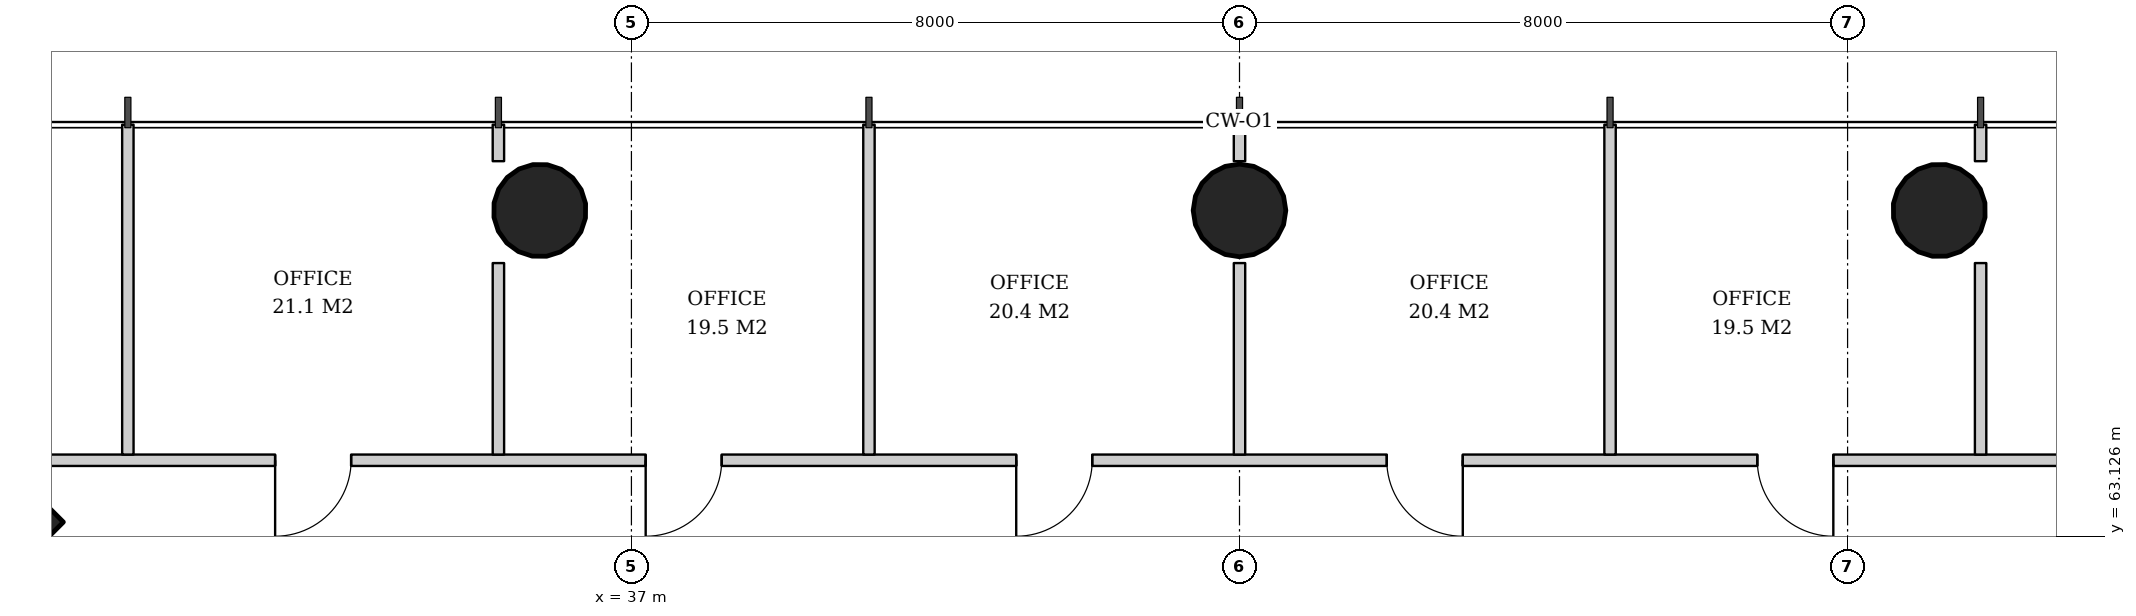
"""IFC4 building model, lengths in metres.
Left out: names, types, materials, properties, quantities, classifications, styles, units other than length and angle.
Written with IfcOpenShell. Run it as: python <this file> out.ifc"""

import sys

from ifc_helpers import new_model, si_unit, direction, frame, frame_2d, origin, origin_2d, place, context, subcontext, project, spatial, rectangle, hollow_circle, extrude, element, fill, save


model = new_model("IFC4")
c1 = context("Model", 3, precision=1e-05, world=origin(), true_north=direction((0.0, 1.0)))
c2 = subcontext(c1, "Body", "Model", "MODEL_VIEW")
j1 = project(units=[si_unit("LENGTHUNIT", "METRE"), si_unit("PLANEANGLEUNIT", "RADIAN")], contexts=[c1])
p1 = place(None, origin())
s1 = spatial("IfcSite", under=j1, at=p1, CompositionType="ELEMENT")
p2 = place(p1, origin())
s2 = spatial("IfcBuilding", under=s1, at=p2, CompositionType="ELEMENT")
p3 = place(p2, frame((0.0, 0.0, 100.8)))
s3 = spatial("IfcBuildingStorey", under=s2, at=p3, CompositionType="ELEMENT", Elevation=100.8)
p4 = place(p3, frame((27.65, 63.35, 0.0), z_axis=(0.031962158256, -0.031962158256, 0.998977898093), x_axis=(0.707106781187, 0.707106781187, 0.0)))
e1 = element("IfcColumn", 1, at=p4, inside=s3, PredefinedType="COLUMN", context=c2, shape_type="SweptSolid", body=[
    extrude(rectangle(XDim=2.6, YDim=2.6, at=origin_2d()), origin(), (0.0, 0.0, 1.0), 3.804),
])
p5 = place(p3, frame((54.225, 67.45, 0.0), z_axis=(-0.015987237665, -0.031910269556, 0.999362868496), x_axis=(0.894067115991, -0.447933021895, 0.0)))
e2 = element("IfcColumn", 2, at=p5, inside=s3, PredefinedType="COLUMN", context=c2, shape_type="SweptSolid", body=[
    extrude(hollow_circle(Radius=0.61, WallThickness=0.04, at=origin_2d()), origin(), (0.0, 0.0, 1.0), 3.802),
])
p6 = place(p3, frame((45.0, 67.45, 0.0), z_axis=(0.0, -0.031914348339, 0.999490607445), x_axis=(1.0, 0.0, 0.0)))
e3 = element("IfcColumn", 3, at=p6, inside=s3, PredefinedType="COLUMN", context=c2, shape_type="SweptSolid", body=[
    extrude(hollow_circle(Radius=0.61, WallThickness=0.04, at=origin_2d()), origin(), (0.0, 0.0, 1.0), 3.802),
])
p7 = place(p3, frame((35.775, 67.45, 0.0), z_axis=(0.015987237665, -0.031910269556, 0.999362868496), x_axis=(0.894067115991, 0.447933021895, 0.0)))
e4 = element("IfcColumn", 4, at=p7, inside=s3, PredefinedType="COLUMN", context=c2, shape_type="SweptSolid", body=[
    extrude(hollow_circle(Radius=0.61, WallThickness=0.04, at=origin_2d()), origin(), (0.0, 0.0, 1.0), 3.802),
])
p8 = place(p3, frame((61.211, 64.125, 0.0), z_axis=(0.0, 0.0, 1.0), x_axis=(-1.0, 0.0, 0.0)))
e5 = element("IfcWall", 5, at=p8, inside=s3, PredefinedType="PARTITIONING", context=c2, shape_type="SweptSolid", body=[
    extrude(rectangle(XDim=32.423, YDim=0.15, at=frame_2d((16.211, 0.0))), origin(), (0.0, 0.0, 1.0), 2.72),
])
p9 = place(p8, frame((3.524, 0.0, 0.0)))
e6 = element("IfcOpeningElement", 6, at=p9, cuts=e5, PredefinedType="OPENING", context=c2, shape_type="SweptSolid", body=[
    extrude(rectangle(XDim=1.0, YDim=2.1, at=frame_2d((0.5, 1.05))), frame((0.0, 0.085, 0.0), z_axis=(0.0, -1.0, 0.0), x_axis=(1.0, 0.0, 0.0)), (0.0, 0.0, 1.0), 0.17),
])
p10 = place(p8, frame((8.399, 0.0, 0.0)))
e7 = element("IfcOpeningElement", 7, at=p10, cuts=e5, PredefinedType="OPENING", context=c2, shape_type="SweptSolid", body=[
    extrude(rectangle(XDim=1.0, YDim=2.1, at=frame_2d((0.5, 1.05))), frame((0.0, 0.085, 0.0), z_axis=(0.0, -1.0, 0.0), x_axis=(1.0, 0.0, 0.0)), (0.0, 0.0, 1.0), 0.17),
])
p11 = place(p8, frame((13.274, 0.0, 0.0)))
e8 = element("IfcOpeningElement", 8, at=p11, cuts=e5, PredefinedType="OPENING", context=c2, shape_type="SweptSolid", body=[
    extrude(rectangle(XDim=1.0, YDim=2.1, at=frame_2d((0.5, 1.05))), frame((0.0, 0.085, 0.0), z_axis=(0.0, -1.0, 0.0), x_axis=(1.0, 0.0, 0.0)), (0.0, 0.0, 1.0), 0.17),
])
p12 = place(p8, frame((18.149, 0.0, 0.0)))
e9 = element("IfcOpeningElement", 9, at=p12, cuts=e5, PredefinedType="OPENING", context=c2, shape_type="SweptSolid", body=[
    extrude(rectangle(XDim=1.0, YDim=2.1, at=frame_2d((0.5, 1.05))), frame((0.0, 0.085, 0.0), z_axis=(0.0, -1.0, 0.0), x_axis=(1.0, 0.0, 0.0)), (0.0, 0.0, 1.0), 0.17),
])
p13 = place(p8, frame((23.024, 0.0, 0.0)))
e10 = element("IfcOpeningElement", 10, at=p13, cuts=e5, PredefinedType="OPENING", context=c2, shape_type="SweptSolid", body=[
    extrude(rectangle(XDim=1.0, YDim=2.1, at=frame_2d((0.5, 1.05))), frame((0.0, 0.085, 0.0), z_axis=(0.0, -1.0, 0.0), x_axis=(1.0, 0.0, 0.0)), (0.0, 0.0, 1.0), 0.17),
])
p14 = place(p8, frame((27.899, 0.0, 0.0)))
e11 = element("IfcOpeningElement", 11, at=p14, cuts=e5, PredefinedType="OPENING", context=c2, shape_type="SweptSolid", body=[
    extrude(rectangle(XDim=1.0, YDim=2.1, at=frame_2d((0.5, 1.05))), frame((0.0, 0.085, 0.0), z_axis=(0.0, -1.0, 0.0), x_axis=(1.0, 0.0, 0.0)), (0.0, 0.0, 1.0), 0.17),
])
p15 = place(p3, frame((54.75, 64.2, 0.0), z_axis=(0.0, 0.0, 1.0), x_axis=(0.0, 1.0, 0.0)))
e12 = element("IfcWall", 12, at=p15, inside=s3, PredefinedType="PARTITIONING", context=c2, shape_type="SweptSolid", body=[
    extrude(rectangle(XDim=2.519, YDim=0.15, at=frame_2d((1.26, 0.0))), origin(), (0.0, 0.0, 1.0), 3.62),
])
p16 = place(p3, frame((54.75, 68.06, 0.0), z_axis=(0.0, 0.0, 1.0), x_axis=(0.0, 1.0, 0.0)))
e13 = element("IfcWall", 13, at=p16, inside=s3, PredefinedType="PARTITIONING", context=c2, shape_type="SweptSolid", body=[
    extrude(rectangle(XDim=0.48, YDim=0.15, at=frame_2d((0.24, 0.0))), origin(), (0.0, 0.0, 1.0), 3.62),
])
p17 = place(p3, frame((49.875, 64.2, 0.0), z_axis=(0.0, 0.0, 1.0), x_axis=(0.0, 1.0, 0.0)))
e14 = element("IfcWall", 14, at=p17, inside=s3, PredefinedType="PARTITIONING", context=c2, shape_type="SweptSolid", body=[
    extrude(rectangle(XDim=4.34, YDim=0.15, at=frame_2d((2.17, 0.0))), origin(), (0.0, 0.0, 1.0), 2.82),
])
p18 = place(p3, frame((45.0, 64.2, 0.0), z_axis=(0.0, 0.0, 1.0), x_axis=(0.0, 1.0, 0.0)))
e15 = element("IfcWall", 15, at=p18, inside=s3, PredefinedType="PARTITIONING", context=c2, shape_type="SweptSolid", body=[
    extrude(rectangle(XDim=2.519, YDim=0.15, at=frame_2d((1.26, 0.0))), origin(), (0.0, 0.0, 1.0), 2.858),
])
p19 = place(p3, frame((45.0, 68.06, 0.0), z_axis=(0.0, 0.0, 1.0), x_axis=(0.0, 1.0, 0.0)))
e16 = element("IfcWall", 16, at=p19, inside=s3, PredefinedType="PARTITIONING", context=c2, shape_type="SweptSolid", body=[
    extrude(rectangle(XDim=0.48, YDim=0.15, at=frame_2d((0.24, 0.0))), origin(), (0.0, 0.0, 1.0), 3.62),
])
p20 = place(p3, frame((40.125, 64.2, 0.0), z_axis=(0.0, 0.0, 1.0), x_axis=(0.0, 1.0, 0.0)))
e17 = element("IfcWall", 17, at=p20, inside=s3, PredefinedType="PARTITIONING", context=c2, shape_type="SweptSolid", body=[
    extrude(rectangle(XDim=4.34, YDim=0.15, at=frame_2d((2.17, 0.0))), origin(), (0.0, 0.0, 1.0), 2.82),
])
p21 = place(p3, frame((35.25, 64.2, 0.0), z_axis=(0.0, 0.0, 1.0), x_axis=(0.0, 1.0, 0.0)))
e18 = element("IfcWall", 18, at=p21, inside=s3, PredefinedType="PARTITIONING", context=c2, shape_type="SweptSolid", body=[
    extrude(rectangle(XDim=2.519, YDim=0.15, at=frame_2d((1.26, 0.0))), origin(), (0.0, 0.0, 1.0), 3.62),
])
p22 = place(p3, frame((35.25, 68.06, 0.0), z_axis=(0.0, 0.0, 1.0), x_axis=(0.0, 1.0, 0.0)))
e19 = element("IfcWall", 19, at=p22, inside=s3, PredefinedType="PARTITIONING", context=c2, shape_type="SweptSolid", body=[
    extrude(rectangle(XDim=0.48, YDim=0.15, at=frame_2d((0.24, 0.0))), origin(), (0.0, 0.0, 1.0), 3.62),
])
p23 = place(p3, frame((30.375, 64.2, 0.0), z_axis=(0.0, 0.0, 1.0), x_axis=(0.0, 1.0, 0.0)))
e20 = element("IfcWall", 20, at=p23, inside=s3, PredefinedType="PARTITIONING", context=c2, shape_type="SweptSolid", body=[
    extrude(rectangle(XDim=4.34, YDim=0.15, at=frame_2d((2.17, 0.0))), origin(), (0.0, 0.0, 1.0), 2.82),
])
p24 = place(p10, origin())
e21 = element("IfcDoor", 21, at=p24, inside=s3, OperationType="SINGLE_SWING_LEFT", PredefinedType="DOOR", context=c2, shape_type="SweptSolid", body=[
    extrude(rectangle(XDim=1.0, YDim=2.1, at=frame_2d((0.5, 1.05))), frame((0.0, 0.025, 0.0), z_axis=(0.0, -1.0, 0.0), x_axis=(1.0, 0.0, 0.0)), (0.0, 0.0, 1.0), 0.05),
])
fill(e7, e21)
p25 = place(p11, origin())
e22 = element("IfcDoor", 22, at=p25, inside=s3, OperationType="SINGLE_SWING_LEFT", PredefinedType="DOOR", context=c2, shape_type="SweptSolid", body=[
    extrude(rectangle(XDim=1.0, YDim=2.1, at=frame_2d((0.5, 1.05))), frame((0.0, 0.025, 0.0), z_axis=(0.0, -1.0, 0.0), x_axis=(1.0, 0.0, 0.0)), (0.0, 0.0, 1.0), 0.05),
])
fill(e8, e22)
p26 = place(p12, origin())
e23 = element("IfcDoor", 23, at=p26, inside=s3, OperationType="SINGLE_SWING_RIGHT", PredefinedType="DOOR", context=c2, shape_type="SweptSolid", body=[
    extrude(rectangle(XDim=1.0, YDim=2.1, at=frame_2d((0.5, 1.05))), frame((0.0, 0.025, 0.0), z_axis=(0.0, -1.0, 0.0), x_axis=(1.0, 0.0, 0.0)), (0.0, 0.0, 1.0), 0.05),
])
fill(e9, e23)
p27 = place(p13, origin())
e24 = element("IfcDoor", 24, at=p27, inside=s3, OperationType="SINGLE_SWING_RIGHT", PredefinedType="DOOR", context=c2, shape_type="SweptSolid", body=[
    extrude(rectangle(XDim=1.0, YDim=2.1, at=frame_2d((0.5, 1.05))), frame((0.0, 0.025, 0.0), z_axis=(0.0, -1.0, 0.0), x_axis=(1.0, 0.0, 0.0)), (0.0, 0.0, 1.0), 0.05),
])
fill(e10, e24)
p28 = place(p14, origin())
e25 = element("IfcDoor", 25, at=p28, inside=s3, OperationType="SINGLE_SWING_RIGHT", PredefinedType="DOOR", context=c2, shape_type="SweptSolid", body=[
    extrude(rectangle(XDim=1.0, YDim=2.1, at=frame_2d((0.5, 1.05))), frame((0.0, 0.025, 0.0), z_axis=(0.0, -1.0, 0.0), x_axis=(1.0, 0.0, 0.0)), (0.0, 0.0, 1.0), 0.05),
])
fill(e11, e25)
save(model, sys.argv[1])
